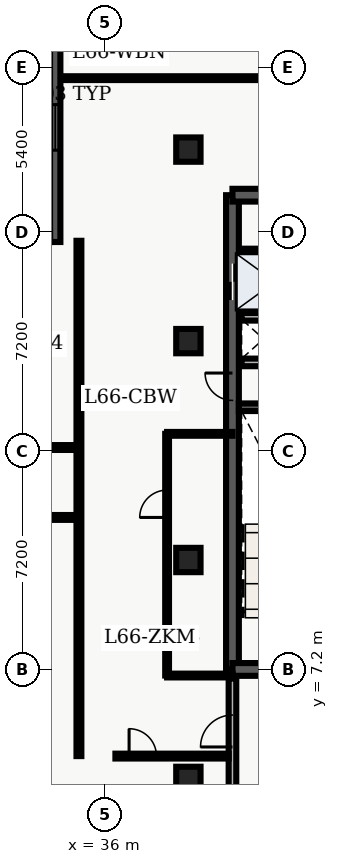
"""IFC4 building model, lengths in metres.
Left out: names, types, materials, properties, quantities, classifications, styles, units other than length and angle.
Written with IfcOpenShell. Run it as: python <this file> out.ifc"""

import sys

from ifc_helpers import new_model, entity, si_unit, converted_unit, direction, frame, origin_with_axes, origin_2d_with_axis, place, context, subcontext, project, spatial, polyline, rectangle, outline, extrude, element, fill, save


model = new_model("IFC4")
c1 = context("Model", 3, precision=1e-05, world=origin_with_axes(), true_north=direction((0.0, 1.0)))
c2 = subcontext(c1, "Body", "Model", "MODEL_VIEW")
j1 = project(units=[si_unit("LENGTHUNIT", "METRE"), converted_unit("PLANEANGLEUNIT", "DEGREE", entity("IfcPlaneAngleMeasure", 0.017), si_unit("PLANEANGLEUNIT", "RADIAN"), dimensions=[0, 0, 0, 0, 0, 0, 0])], contexts=[c1])
p1 = place(None, origin_with_axes())
s1 = spatial("IfcSite", under=j1, at=p1, CompositionType="ELEMENT")
p2 = place(p1, origin_with_axes())
s2 = spatial("IfcBuilding", under=s1, at=p2, CompositionType="ELEMENT")
p3 = place(p2, frame((0.0, 0.0, 268.5), z_axis=(0.0, 0.0, 1.0), x_axis=(1.0, 0.0, 0.0)))
s3 = spatial("IfcBuildingStorey", under=s2, at=p3, CompositionType="ELEMENT", Elevation=268.5)
p4 = place(p3, frame((40.2, 7.2, 0.0), z_axis=(0.0, 0.0, 1.0), x_axis=(0.0, 1.0, 0.0)))
e1 = element("IfcWall", 1, at=p4, inside=s3, PredefinedType="SHEAR", context=c2, shape_type="SweptSolid", body=[
    extrude(outline(polyline([(0.0, -0.21), (15.6, -0.21), (15.6, 0.21), (0.0, 0.21), (0.0, -0.21)])), origin_with_axes(), (0.0, 0.0, 1.0), 3.66),
])
p5 = place(p4, frame((12.75, 0.0, 0.0), z_axis=(0.0, 0.0, 1.0), x_axis=(1.0, 0.0, 0.0)))
e2 = element("IfcOpeningElement", 2, at=p5, cuts=e1, PredefinedType="OPENING", context=c2, shape_type="SweptSolid", body=[
    extrude(rectangle(XDim=1.2, YDim=0.44, at=origin_2d_with_axis()), origin_with_axes(), (0.0, 0.0, 1.0), 2.15),
])
p6 = place(p4, frame((9.3, 0.0, 0.0), z_axis=(0.0, 0.0, 1.0), x_axis=(1.0, 0.0, 0.0)))
e3 = element("IfcOpeningElement", 3, at=p6, cuts=e1, PredefinedType="OPENING", context=c2, shape_type="SweptSolid", body=[
    extrude(rectangle(XDim=0.9, YDim=0.44, at=origin_2d_with_axis()), origin_with_axes(), (0.0, 0.0, 1.0), 2.15),
])
p7 = place(p3, frame((40.2, 7.2, 0.0), z_axis=(0.0, 0.0, 1.0), x_axis=(1.0, 0.0, 0.0)))
e4 = element("IfcWall", 4, at=p7, inside=s3, PredefinedType="SHEAR", context=c2, shape_type="SweptSolid", body=[
    extrude(outline(polyline([(0.0, -0.21), (7.85, -0.21), (7.85, 0.21), (0.0, 0.21), (0.0, -0.21)])), origin_with_axes(), (0.0, 0.0, 1.0), 3.66),
])
p8 = place(p7, frame((2.175, 0.0, 0.0), z_axis=(0.0, 0.0, 1.0), x_axis=(1.0, 0.0, 0.0)))
e5 = element("IfcOpeningElement", 5, at=p8, cuts=e4, PredefinedType="OPENING", context=c2, shape_type="SweptSolid", body=[
    extrude(rectangle(XDim=1.05, YDim=0.44, at=origin_2d_with_axis()), origin_with_axes(), (0.0, 0.0, 1.0), 2.15),
])
p9 = place(p3, frame((40.2, 22.8, 0.0), z_axis=(0.0, 0.0, 1.0), x_axis=(1.0, 0.0, 0.0)))
e6 = element("IfcWall", 6, at=p9, inside=s3, PredefinedType="SHEAR", context=c2, shape_type="SweptSolid", body=[
    extrude(outline(polyline([(0.0, -0.21), (7.85, -0.21), (7.85, 0.21), (0.0, 0.21), (0.0, -0.21)])), origin_with_axes(), (0.0, 0.0, 1.0), 3.66),
])
p10 = place(p9, frame((5.775, 0.0, 0.0), z_axis=(0.0, 0.0, 1.0), x_axis=(1.0, 0.0, 0.0)))
e7 = element("IfcOpeningElement", 7, at=p10, cuts=e6, PredefinedType="OPENING", context=c2, shape_type="SweptSolid", body=[
    extrude(rectangle(XDim=1.05, YDim=0.44, at=origin_2d_with_axis()), origin_with_axes(), (0.0, 0.0, 1.0), 2.15),
])
p11 = place(p9, frame((2.15, 0.0, 0.0), z_axis=(0.0, 0.0, 1.0), x_axis=(1.0, 0.0, 0.0)))
e8 = element("IfcOpeningElement", 8, at=p11, cuts=e6, PredefinedType="OPENING", context=c2, shape_type="SweptSolid", body=[
    extrude(rectangle(XDim=0.9, YDim=0.44, at=origin_2d_with_axis()), origin_with_axes(), (0.0, 0.0, 1.0), 2.15),
])
p12 = place(p3, frame((40.41, 15.825, 0.0), z_axis=(0.0, 0.0, 1.0), x_axis=(1.0, 0.0, 0.0)))
e9 = element("IfcWall", 9, at=p12, inside=s3, PredefinedType="SHEAR", context=c2, shape_type="SweptSolid", body=[
    extrude(outline(polyline([(0.0, -0.125), (3.59, -0.125), (3.59, 0.125), (0.0, 0.125), (0.0, -0.125)])), origin_with_axes(), (0.0, 0.0, 1.0), 3.66),
])
p13 = place(p3, frame((40.5, 17.3, 0.0), z_axis=(0.0, 0.0, 1.0), x_axis=(1.0, 0.0, 0.0)))
e10 = element("IfcWall", 10, at=p13, inside=s3, PredefinedType="SOLIDWALL", context=c2, shape_type="SweptSolid", body=[
    extrude(outline(polyline([(0.0, -0.125), (3.5, -0.125), (3.5, 0.125), (0.0, 0.125), (0.0, -0.125)])), origin_with_axes(), (0.0, 0.0, 1.0), 2.7),
])
p14 = place(p13, frame((2.4, 0.0, 0.0), z_axis=(0.0, 0.0, 1.0), x_axis=(1.0, 0.0, 0.0)))
e11 = element("IfcOpeningElement", 11, at=p14, cuts=e10, PredefinedType="OPENING", context=c2, shape_type="SweptSolid", body=[
    extrude(rectangle(XDim=0.9, YDim=0.27, at=origin_2d_with_axis()), origin_with_axes(), (0.0, 0.0, 1.0), 2.15),
])
p15 = place(p3, frame((40.5, 18.8, 0.0), z_axis=(0.0, 0.0, 1.0), x_axis=(1.0, 0.0, 0.0)))
e12 = element("IfcWall", 12, at=p15, inside=s3, PredefinedType="SOLIDWALL", context=c2, shape_type="SweptSolid", body=[
    extrude(outline(polyline([(0.0, -0.125), (3.5, -0.125), (3.5, 0.125), (0.0, 0.125), (0.0, -0.125)])), origin_with_axes(), (0.0, 0.0, 1.0), 2.7),
])
p16 = place(p3, frame((40.2, 3.1, 0.0), z_axis=(0.0, 0.0, 1.0), x_axis=(0.0, 1.0, 0.0)))
e13 = element("IfcWall", 13, at=p16, inside=s3, PredefinedType="SOLIDWALL", context=c2, shape_type="SweptSolid", body=[
    extrude(outline(polyline([(0.0, -0.125), (3.8, -0.125), (3.8, 0.125), (0.0, 0.125), (0.0, -0.125)])), origin_with_axes(), (0.0, 0.0, 1.0), 2.7),
])
p17 = place(p16, frame((2.075, 0.0, 0.0), z_axis=(0.0, 0.0, 1.0), x_axis=(1.0, 0.0, 0.0)))
e14 = element("IfcOpeningElement", 14, at=p17, cuts=e13, PredefinedType="OPENING", context=c2, shape_type="SweptSolid", body=[
    extrude(rectangle(XDim=1.05, YDim=0.27, at=origin_2d_with_axis()), origin_with_axes(), (0.0, 0.0, 1.0), 2.15),
])
for number, where, z_axis, x_axis in (
    (15, (38.75, 3.6, 0.0), (0.0, 0.0, 1.0), (1.0, 0.0, 0.0)),
    (16, (38.75, 10.8, 0.0), (0.0, 0.0, 1.0), (1.0, 0.0, 0.0)),
    (17, (38.75, 18.0, 0.0), (0.0, 0.0, 1.0), (1.0, 0.0, 0.0)),
    (18, (38.75, 24.3, 0.0), (0.0, 0.0, 1.0), (1.0, 0.0, 0.0)),
):
    element("IfcColumn", number, at=place(p3, frame(where, z_axis=z_axis, x_axis=x_axis)), inside=s3, PredefinedType="COLUMN", context=c2, shape_type="SweptSolid", body=[
        extrude(rectangle(XDim=0.8, YDim=0.8, at=origin_2d_with_axis()), origin_with_axes(), (0.0, 0.0, 1.0), 3.9),
    ])
p18 = place(p3, frame((40.5, 20.96, 0.0), z_axis=(0.0, 0.0, 1.0), x_axis=(1.0, 0.0, 0.0)))
e19 = element("IfcWall", 19, at=p18, inside=s3, PredefinedType="PARTITIONING", context=c2, shape_type="SweptSolid", body=[
    extrude(outline(polyline([(0.0, -0.08), (3.5, -0.08), (3.5, 0.08), (0.0, 0.08), (0.0, -0.08)])), origin_with_axes(), (0.0, 0.0, 1.0), 2.7),
])
p19 = place(p3, frame((20.3, 12.2, 0.0), z_axis=(0.0, 0.0, 1.0), x_axis=(1.0, 0.0, 0.0)))
e20 = element("IfcWall", 20, at=p19, inside=s3, PredefinedType="PARTITIONING", context=c2, shape_type="SweptSolid", body=[
    extrude(outline(polyline([(0.0, -0.08), (14.85, -0.08), (14.85, 0.08), (0.0, 0.08), (0.0, -0.08)])), origin_with_axes(), (0.0, 0.0, 1.0), 2.7),
])
p20 = place(p19, frame((8.355, 0.0, 0.0), z_axis=(0.0, 0.0, 1.0), x_axis=(1.0, 0.0, 0.0)))
e21 = element("IfcOpeningElement", 21, at=p20, cuts=e20, PredefinedType="OPENING", context=c2, shape_type="SweptSolid", body=[
    extrude(rectangle(XDim=1.0, YDim=0.18, at=origin_2d_with_axis()), origin_with_axes(), (0.0, 0.0, 1.0), 2.15),
])
p21 = place(p3, frame((20.3, 14.5, 0.0), z_axis=(0.0, 0.0, 1.0), x_axis=(1.0, 0.0, 0.0)))
e22 = element("IfcWall", 22, at=p21, inside=s3, PredefinedType="PARTITIONING", context=c2, shape_type="SweptSolid", body=[
    extrude(outline(polyline([(0.0, -0.08), (14.85, -0.08), (14.85, 0.08), (0.0, 0.08), (0.0, -0.08)])), origin_with_axes(), (0.0, 0.0, 1.0), 2.7),
])
p22 = place(p21, frame((2.495, 0.0, 0.0), z_axis=(0.0, 0.0, 1.0), x_axis=(1.0, 0.0, 0.0)))
e23 = element("IfcOpeningElement", 23, at=p22, cuts=e22, PredefinedType="OPENING", context=c2, shape_type="SweptSolid", body=[
    extrude(rectangle(XDim=1.0, YDim=0.18, at=origin_2d_with_axis()), origin_with_axes(), (0.0, 0.0, 1.0), 2.15),
])
p23 = place(p21, frame((6.056, 0.0, 0.0), z_axis=(0.0, 0.0, 1.0), x_axis=(1.0, 0.0, 0.0)))
e24 = element("IfcOpeningElement", 24, at=p23, cuts=e22, PredefinedType="OPENING", context=c2, shape_type="SweptSolid", body=[
    extrude(rectangle(XDim=1.0, YDim=0.18, at=origin_2d_with_axis()), origin_with_axes(), (0.0, 0.0, 1.0), 2.15),
])
p24 = place(p21, frame((9.19, 0.0, 0.0), z_axis=(0.0, 0.0, 1.0), x_axis=(1.0, 0.0, 0.0)))
e25 = element("IfcOpeningElement", 25, at=p24, cuts=e22, PredefinedType="OPENING", context=c2, shape_type="SweptSolid", body=[
    extrude(rectangle(XDim=1.0, YDim=0.18, at=origin_2d_with_axis()), origin_with_axes(), (0.0, 0.0, 1.0), 2.15),
])
p25 = place(p21, frame((12.925, 0.0, 0.0), z_axis=(0.0, 0.0, 1.0), x_axis=(1.0, 0.0, 0.0)))
e26 = element("IfcOpeningElement", 26, at=p25, cuts=e22, PredefinedType="OPENING", context=c2, shape_type="SweptSolid", body=[
    extrude(rectangle(XDim=1.0, YDim=0.18, at=origin_2d_with_axis()), origin_with_axes(), (0.0, 0.0, 1.0), 2.15),
])
p26 = place(p3, frame((35.15, 4.35, 0.0), z_axis=(0.0, 0.0, 1.0), x_axis=(0.0, 1.0, 0.0)))
e27 = element("IfcWall", 27, at=p26, inside=s3, PredefinedType="PARTITIONING", context=c2, shape_type="SweptSolid", body=[
    extrude(outline(polyline([(0.0, -0.08), (16.95, -0.08), (16.95, 0.08), (0.0, 0.08), (0.0, -0.08)])), origin_with_axes(), (0.0, 0.0, 1.0), 2.7),
])
p27 = place(p3, frame((34.535, 26.65, 0.0), z_axis=(0.0, 0.0, 1.0), x_axis=(1.0, 0.0, 0.0)))
e28 = element("IfcWall", 28, at=p27, inside=s3, PredefinedType="PARTITIONING", context=c2, shape_type="SweptSolid", body=[
    extrude(outline(polyline([(0.0, -0.062), (12.995, -0.062), (12.995, 0.062), (0.0, 0.062), (0.0, -0.062)])), origin_with_axes(), (0.0, 0.0, 1.0), 2.7),
])
p28 = place(p27, frame((8.465, 0.0, 0.0), z_axis=(0.0, 0.0, 1.0), x_axis=(1.0, 0.0, 0.0)))
e29 = element("IfcOpeningElement", 29, at=p28, cuts=e28, PredefinedType="OPENING", context=c2, shape_type="SweptSolid", body=[
    extrude(rectangle(XDim=1.0, YDim=0.145, at=origin_2d_with_axis()), origin_with_axes(), (0.0, 0.0, 1.0), 2.15),
])
p29 = place(p3, frame((36.35, 4.35, 0.0), z_axis=(0.0, 0.0, 1.0), x_axis=(1.0, 0.0, 0.0)))
e30 = element("IfcWall", 30, at=p29, inside=s3, PredefinedType="PARTITIONING", context=c2, shape_type="SweptSolid", body=[
    extrude(outline(polyline([(0.0, -0.08), (3.725, -0.08), (3.725, 0.08), (0.0, 0.08), (0.0, -0.08)])), origin_with_axes(), (0.0, 0.0, 1.0), 2.7),
])
p30 = place(p29, frame((0.9, 0.0, 0.0), z_axis=(0.0, 0.0, 1.0), x_axis=(1.0, 0.0, 0.0)))
e31 = element("IfcOpeningElement", 31, at=p30, cuts=e30, PredefinedType="OPENING", context=c2, shape_type="SweptSolid", body=[
    extrude(rectangle(XDim=0.9, YDim=0.18, at=origin_2d_with_axis()), origin_with_axes(), (0.0, 0.0, 1.0), 2.15),
])
for number, where, z_axis, x_axis in (
    (32, (38.05, 7.0, 0.0), (0.0, 0.0, 1.0), (1.0, 0.0, 0.0)),
    (33, (38.05, 14.95, 0.0), (0.0, 0.0, 1.0), (1.0, 0.0, 0.0)),
):
    element("IfcWall", number, at=place(p3, frame(where, z_axis=z_axis, x_axis=x_axis)), inside=s3, PredefinedType="PARTITIONING", context=c2, shape_type="SweptSolid", body=[
        extrude(outline(polyline([(0.0, -0.062), (2.15, -0.062), (2.15, 0.062), (0.0, 0.062), (0.0, -0.062)])), origin_with_axes(), (0.0, 0.0, 1.0), 2.7),
    ])
p31 = place(p3, frame((38.05, 7.0, 0.0), z_axis=(0.0, 0.0, 1.0), x_axis=(0.0, 1.0, 0.0)))
e34 = element("IfcWall", 34, at=p31, inside=s3, PredefinedType="PARTITIONING", context=c2, shape_type="SweptSolid", body=[
    extrude(outline(polyline([(0.0, -0.062), (7.95, -0.062), (7.95, 0.062), (0.0, 0.062), (0.0, -0.062)])), origin_with_axes(), (0.0, 0.0, 1.0), 2.7),
])
p32 = place(p31, frame((5.65, 0.0, 0.0), z_axis=(0.0, 0.0, 1.0), x_axis=(1.0, 0.0, 0.0)))
e35 = element("IfcOpeningElement", 35, at=p32, cuts=e34, PredefinedType="OPENING", context=c2, shape_type="SweptSolid", body=[
    extrude(rectangle(XDim=0.9, YDim=0.145, at=origin_2d_with_axis()), origin_with_axes(), (0.0, 0.0, 1.0), 2.15),
])
p33 = place(p3, frame((34.37, 21.26, 0.0), z_axis=(0.0, 0.0, 1.0), x_axis=(0.0, 1.0, 0.0)))
e36 = element("IfcWall", 36, at=p33, inside=s3, PredefinedType="SOLIDWALL", context=c2, shape_type="SweptSolid", body=[
    extrude(outline(polyline([(0.0, -0.17), (7.54, -0.17), (7.54, 0.17), (0.0, 0.17), (0.0, -0.17)])), origin_with_axes(), (0.0, 0.0, 1.0), 3.66),
])
p34 = place(p33, frame((3.77, 0.0, 0.45), z_axis=(0.0, 0.0, 1.0), x_axis=(1.0, 0.0, 0.0)))
e37 = element("IfcOpeningElement", 37, at=p34, cuts=e36, PredefinedType="OPENING", context=c2, shape_type="SweptSolid", body=[
    extrude(rectangle(XDim=1.5, YDim=0.36, at=origin_2d_with_axis()), origin_with_axes(), (0.0, 0.0, 1.0), 2.1),
])
p35 = place(p4, frame((12.75, 0.0, 0.0), z_axis=(0.0, 0.0, 1.0), x_axis=(1.0, 0.0, 0.0)))
e38 = element("IfcDoor", 38, at=p35, inside=s3, OperationType="DOUBLE_DOOR_SLIDING", PredefinedType="DOOR", context=c2, shape_type="SweptSolid", body=[
    extrude(rectangle(XDim=1.2, YDim=0.09, at=origin_2d_with_axis()), origin_with_axes(), (0.0, 0.0, 1.0), 2.15),
])
fill(e2, e38)
p36 = place(p4, frame((9.3, 0.0, 0.0), z_axis=(0.0, 0.0, 1.0), x_axis=(1.0, 0.0, 0.0)))
e39 = element("IfcDoor", 39, at=p36, inside=s3, OperationType="SINGLE_SWING_RIGHT", PredefinedType="DOOR", context=c2, shape_type="SweptSolid", body=[
    extrude(rectangle(XDim=0.9, YDim=0.09, at=origin_2d_with_axis()), origin_with_axes(), (0.0, 0.0, 1.0), 2.15),
])
fill(e3, e39)
p37 = place(p16, frame((2.075, 0.0, 0.0), z_axis=(0.0, 0.0, 1.0), x_axis=(1.0, 0.0, 0.0)))
e40 = element("IfcDoor", 40, at=p37, inside=s3, OperationType="SINGLE_SWING_LEFT", PredefinedType="DOOR", context=c2, shape_type="SweptSolid", body=[
    extrude(rectangle(XDim=1.05, YDim=0.09, at=origin_2d_with_axis()), origin_with_axes(), (0.0, 0.0, 1.0), 2.15),
])
fill(e14, e40)
p38 = place(p29, frame((0.9, 0.0, 0.0), z_axis=(0.0, 0.0, 1.0), x_axis=(1.0, 0.0, 0.0)))
e41 = element("IfcDoor", 41, at=p38, inside=s3, OperationType="SINGLE_SWING_LEFT", PredefinedType="DOOR", context=c2, shape_type="SweptSolid", body=[
    extrude(rectangle(XDim=0.9, YDim=0.09, at=origin_2d_with_axis()), origin_with_axes(), (0.0, 0.0, 1.0), 2.15),
])
fill(e31, e41)
p39 = place(p31, frame((5.65, 0.0, 0.0), z_axis=(0.0, 0.0, 1.0), x_axis=(1.0, 0.0, 0.0)))
e42 = element("IfcDoor", 42, at=p39, inside=s3, OperationType="SINGLE_SWING_LEFT", PredefinedType="DOOR", context=c2, shape_type="SweptSolid", body=[
    extrude(rectangle(XDim=0.9, YDim=0.075, at=origin_2d_with_axis()), origin_with_axes(), (0.0, 0.0, 1.0), 2.15),
])
fill(e35, e42)
p40 = place(p33, frame((3.77, 0.0, 0.45), z_axis=(0.0, 0.0, 1.0), x_axis=(1.0, 0.0, 0.0)))
e43 = element("IfcWindow", 43, at=p40, inside=s3, PredefinedType="WINDOW", context=c2, shape_type="SweptSolid", body=[
    extrude(rectangle(XDim=1.5, YDim=0.09, at=origin_2d_with_axis()), origin_with_axes(), (0.0, 0.0, 1.0), 2.1),
])
fill(e37, e43)
save(model, sys.argv[1])
